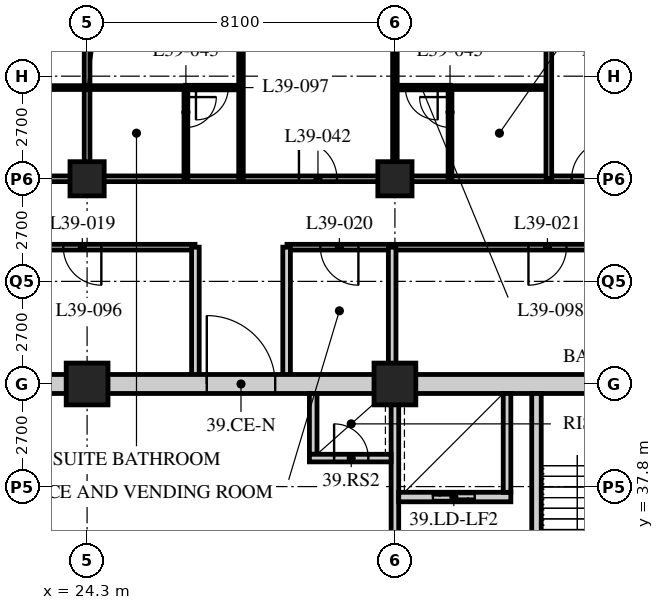
"""IFC4 building model, lengths in metres.
Left out: names, types, materials, properties, quantities, classifications, styles, units other than length and angle.
Written with IfcOpenShell. Run it as: python <this file> out.ifc"""

import sys

from ifc_helpers import new_model, si_unit, direction, frame, frame_2d, origin, origin_2d, place, context, subcontext, project, spatial, rectangle, hollow_rectangle, extrude, element, fill, save


model = new_model("IFC4")
c1 = context("Model", 3, precision=1e-05, world=origin(), true_north=direction((0.0, 1.0)))
c2 = subcontext(c1, "Body", "Model", "MODEL_VIEW")
j1 = project(units=[si_unit("LENGTHUNIT", "METRE"), si_unit("PLANEANGLEUNIT", "RADIAN")], contexts=[c1])
p1 = place(None, origin())
s1 = spatial("IfcSite", under=j1, at=p1, CompositionType="ELEMENT")
p2 = place(p1, origin())
s2 = spatial("IfcBuilding", under=s1, at=p2, CompositionType="ELEMENT")
p3 = place(p2, frame((0.0, 0.0, 151.0)))
s3 = spatial("IfcBuildingStorey", under=s2, at=p3, CompositionType="ELEMENT", Elevation=151.0)
p4 = place(p3, frame((24.3, 40.5, 0.0), z_axis=(0.0, 0.0, 1.0), x_axis=(1.0, 0.0, 0.0)))
e1 = element("IfcColumn", 1, at=p4, inside=s3, PredefinedType="COLUMN", context=c2, shape_type="SweptSolid", body=[
    extrude(hollow_rectangle(XDim=1.1, YDim=1.1, WallThickness=0.1, at=origin_2d()), origin(), (0.0, 0.0, 1.0), 3.4),
])
p5 = place(p3, frame((24.3, 45.9, 0.0), z_axis=(0.0, 0.0, 1.0), x_axis=(1.0, 0.0, 0.0)))
e2 = element("IfcColumn", 2, at=p5, inside=s3, PredefinedType="COLUMN", context=c2, shape_type="SweptSolid", body=[
    extrude(hollow_rectangle(XDim=0.9, YDim=0.9, WallThickness=0.1, at=origin_2d()), origin(), (0.0, 0.0, 1.0), 3.4),
])
p6 = place(p3, frame((32.4, 40.5, 0.0), z_axis=(0.0, 0.0, 1.0), x_axis=(1.0, 0.0, 0.0)))
e3 = element("IfcColumn", 3, at=p6, inside=s3, PredefinedType="COLUMN", context=c2, shape_type="SweptSolid", body=[
    extrude(hollow_rectangle(XDim=1.1, YDim=1.1, WallThickness=0.1, at=origin_2d()), origin(), (0.0, 0.0, 1.0), 3.4),
])
p7 = place(p3, frame((32.4, 45.9, 0.0), z_axis=(0.0, 0.0, 1.0), x_axis=(1.0, 0.0, 0.0)))
e4 = element("IfcColumn", 4, at=p7, inside=s3, PredefinedType="COLUMN", context=c2, shape_type="SweptSolid", body=[
    extrude(hollow_rectangle(XDim=0.9, YDim=0.9, WallThickness=0.1, at=origin_2d()), origin(), (0.0, 0.0, 1.0), 3.4),
])
p8 = place(p3, frame((8.1, 45.9, 0.0), z_axis=(0.0, 0.0, 1.0), x_axis=(1.0, 0.0, 0.0)))
e5 = element("IfcWall", 5, at=p8, inside=s3, PredefinedType="PARTITIONING", context=c2, shape_type="SweptSolid", body=[
    extrude(rectangle(XDim=40.5, YDim=0.15, at=frame_2d((20.25, 0.0))), origin(), (0.0, 0.0, 1.0), 2.42),
])
p9 = place(p8, frame((9.625, 0.0, 0.0)))
e6 = element("IfcOpeningElement", 6, at=p9, cuts=e5, PredefinedType="OPENING", context=c2, shape_type="SweptSolid", body=[
    extrude(rectangle(XDim=1.0, YDim=2.1, at=frame_2d((0.5, 1.05))), frame((0.0, 0.085, 0.0), z_axis=(0.0, -1.0, 0.0), x_axis=(1.0, 0.0, 0.0)), (0.0, 0.0, 1.0), 0.17),
])
p10 = place(p8, frame((21.775, 0.0, 0.0)))
e7 = element("IfcOpeningElement", 7, at=p10, cuts=e5, PredefinedType="OPENING", context=c2, shape_type="SweptSolid", body=[
    extrude(rectangle(XDim=1.0, YDim=2.1, at=frame_2d((0.5, 1.05))), frame((0.0, 0.085, 0.0), z_axis=(0.0, -1.0, 0.0), x_axis=(1.0, 0.0, 0.0)), (0.0, 0.0, 1.0), 0.17),
])
p11 = place(p8, frame((28.95, 0.0, 0.0)))
e8 = element("IfcOpeningElement", 8, at=p11, cuts=e5, PredefinedType="OPENING", context=c2, shape_type="SweptSolid", body=[
    extrude(rectangle(XDim=1.0, YDim=2.1, at=frame_2d((0.5, 1.05))), frame((0.0, 0.085, 0.0), z_axis=(0.0, -1.0, 0.0), x_axis=(1.0, 0.0, 0.0)), (0.0, 0.0, 1.0), 0.17),
])
p12 = place(p8, frame((34.85, 0.0, 0.0)))
e9 = element("IfcOpeningElement", 9, at=p12, cuts=e5, PredefinedType="OPENING", context=c2, shape_type="SweptSolid", body=[
    extrude(rectangle(XDim=1.0, YDim=2.1, at=frame_2d((0.5, 1.05))), frame((0.0, 0.085, 0.0), z_axis=(0.0, -1.0, 0.0), x_axis=(1.0, 0.0, 0.0)), (0.0, 0.0, 1.0), 0.17),
])
p13 = place(p8, frame((36.875, 0.0, 0.0)))
e10 = element("IfcOpeningElement", 10, at=p13, cuts=e5, PredefinedType="OPENING", context=c2, shape_type="SweptSolid", body=[
    extrude(rectangle(XDim=1.0, YDim=2.1, at=frame_2d((0.5, 1.05))), frame((0.0, 0.085, 0.0), z_axis=(0.0, -1.0, 0.0), x_axis=(1.0, 0.0, 0.0)), (0.0, 0.0, 1.0), 0.17),
])
p14 = place(p8, frame((2.625, 0.0, 0.0)))
e11 = element("IfcOpeningElement", 11, at=p14, cuts=e5, PredefinedType="OPENING", context=c2, shape_type="SweptSolid", body=[
    extrude(rectangle(XDim=1.0, YDim=2.1, at=frame_2d((0.5, 1.05))), frame((0.0, 0.085, 0.0), z_axis=(0.0, -1.0, 0.0), x_axis=(1.0, 0.0, 0.0)), (0.0, 0.0, 1.0), 0.17),
])
p15 = place(p3, frame((46.8, 44.1, 0.0), z_axis=(0.0, 0.0, 1.0), x_axis=(-1.0, 0.0, 0.0)))
e12 = element("IfcWall", 12, at=p15, inside=s3, PredefinedType="PARTITIONING", context=c2, shape_type="SweptSolid", body=[
    extrude(rectangle(XDim=17.24, YDim=0.15, at=frame_2d((8.62, 0.0))), origin(), (0.0, 0.0, 1.0), 3.19),
])
p16 = place(p15, frame((15.361, 0.0, 0.0)))
e13 = element("IfcOpeningElement", 13, at=p16, cuts=e12, PredefinedType="OPENING", context=c2, shape_type="SweptSolid", body=[
    extrude(rectangle(XDim=1.0, YDim=2.1, at=frame_2d((0.5, 1.05))), frame((0.0, 0.085, 0.0), z_axis=(0.0, -1.0, 0.0), x_axis=(1.0, 0.0, 0.0)), (0.0, 0.0, 1.0), 0.17),
])
p17 = place(p15, frame((9.886, 0.0, 0.0)))
e14 = element("IfcOpeningElement", 14, at=p17, cuts=e12, PredefinedType="OPENING", context=c2, shape_type="SweptSolid", body=[
    extrude(rectangle(XDim=1.0, YDim=2.1, at=frame_2d((0.5, 1.05))), frame((0.0, 0.085, 0.0), z_axis=(0.0, -1.0, 0.0), x_axis=(1.0, 0.0, 0.0)), (0.0, 0.0, 1.0), 0.17),
])
p18 = place(p15, frame((2.65, 0.0, 0.0)))
e15 = element("IfcOpeningElement", 15, at=p18, cuts=e12, PredefinedType="OPENING", context=c2, shape_type="SweptSolid", body=[
    extrude(rectangle(XDim=1.0, YDim=2.1, at=frame_2d((0.5, 1.05))), frame((0.0, 0.085, 0.0), z_axis=(0.0, -1.0, 0.0), x_axis=(1.0, 0.0, 0.0)), (0.0, 0.0, 1.0), 0.17),
])
p19 = place(p3, frame((27.14, 44.1, 0.0), z_axis=(0.0, 0.0, 1.0), x_axis=(-1.0, 0.0, 0.0)))
e16 = element("IfcWall", 16, at=p19, inside=s3, PredefinedType="PARTITIONING", context=c2, shape_type="SweptSolid", body=[
    extrude(rectangle(XDim=17.24, YDim=0.15, at=frame_2d((8.62, 0.0))), origin(), (0.0, 0.0, 1.0), 3.19),
])
p20 = place(p19, frame((15.351, 0.0, 0.0)))
e17 = element("IfcOpeningElement", 17, at=p20, cuts=e16, PredefinedType="OPENING", context=c2, shape_type="SweptSolid", body=[
    extrude(rectangle(XDim=1.0, YDim=2.1, at=frame_2d((0.5, 1.05))), frame((0.0, 0.085, 0.0), z_axis=(0.0, -1.0, 0.0), x_axis=(1.0, 0.0, 0.0)), (0.0, 0.0, 1.0), 0.17),
])
p21 = place(p19, frame((12.201, 0.0, 0.0)))
e18 = element("IfcOpeningElement", 18, at=p21, cuts=e16, PredefinedType="OPENING", context=c2, shape_type="SweptSolid", body=[
    extrude(rectangle(XDim=1.0, YDim=2.1, at=frame_2d((0.5, 1.05))), frame((0.0, 0.085, 0.0), z_axis=(0.0, -1.0, 0.0), x_axis=(1.0, 0.0, 0.0)), (0.0, 0.0, 1.0), 0.17),
])
p22 = place(p19, frame((7.94, 0.0, 0.0)))
e19 = element("IfcOpeningElement", 19, at=p22, cuts=e16, PredefinedType="OPENING", context=c2, shape_type="SweptSolid", body=[
    extrude(rectangle(XDim=1.0, YDim=2.1, at=frame_2d((0.5, 1.05))), frame((0.0, 0.085, 0.0), z_axis=(0.0, -1.0, 0.0), x_axis=(1.0, 0.0, 0.0)), (0.0, 0.0, 1.0), 0.17),
])
p23 = place(p19, frame((2.465, 0.0, 0.0)))
e20 = element("IfcOpeningElement", 20, at=p23, cuts=e16, PredefinedType="OPENING", context=c2, shape_type="SweptSolid", body=[
    extrude(rectangle(XDim=1.0, YDim=2.1, at=frame_2d((0.5, 1.05))), frame((0.0, 0.085, 0.0), z_axis=(0.0, -1.0, 0.0), x_axis=(1.0, 0.0, 0.0)), (0.0, 0.0, 1.0), 0.17),
])
p24 = place(p3, frame((32.328, 44.1, 0.0), z_axis=(0.0, 0.0, 1.0), x_axis=(0.0, -1.0, 0.0)))
e21 = element("IfcWall", 21, at=p24, inside=s3, PredefinedType="SOLIDWALL", context=c2, shape_type="SweptSolid", body=[
    extrude(rectangle(XDim=3.6, YDim=0.2, at=frame_2d((1.8, 0.0))), origin(), (0.0, 0.0, 1.0), 2.42),
])
for number, where, z_axis, x_axis in (
    (22, (27.15, 40.5, 0.0), (0.0, 0.0, 1.0), (0.0, 1.0, 0.0)),
    (23, (29.55, 40.5, 0.0), (0.0, 0.0, 1.0), (0.0, 1.0, 0.0)),
):
    element("IfcWall", number, at=place(p3, frame(where, z_axis=z_axis, x_axis=x_axis)), inside=s3, PredefinedType="SOLIDWALL", context=c2, shape_type="SweptSolid", body=[
        extrude(rectangle(XDim=3.6, YDim=0.2, at=frame_2d((1.8, 0.0))), origin(), (0.0, 0.0, 1.0), 3.19),
    ])
p25 = place(p3, frame((21.7, 48.3, 0.0), z_axis=(0.0, 0.0, 1.0), x_axis=(1.0, 0.0, 0.0)))
e24 = element("IfcWall", 24, at=p25, inside=s3, PredefinedType="PARTITIONING", context=c2, shape_type="SweptSolid", body=[
    extrude(rectangle(XDim=5.2, YDim=0.1, at=frame_2d((2.6, 0.0))), origin(), (0.0, 0.0, 1.0), 3.19),
])
p26 = place(p3, frame((24.3, 45.9, 0.0), z_axis=(0.0, 0.0, 1.0), x_axis=(0.0, 1.0, 0.0)))
e25 = element("IfcWall", 25, at=p26, inside=s3, PredefinedType="PARTITIONING", context=c2, shape_type="SweptSolid", body=[
    extrude(rectangle(XDim=7.8, YDim=0.15, at=frame_2d((3.9, 0.0))), origin(), (0.0, 0.0, 1.0), 2.42),
])
p27 = place(p3, frame((26.9, 45.9, 0.0), z_axis=(0.0, 0.0, 1.0), x_axis=(0.0, 1.0, 0.0)))
e26 = element("IfcWall", 26, at=p27, inside=s3, PredefinedType="PARTITIONING", context=c2, shape_type="SweptSolid", body=[
    extrude(rectangle(XDim=2.4, YDim=0.1, at=frame_2d((1.2, 0.0))), origin(), (0.0, 0.0, 1.0), 3.19),
])
p28 = place(p27, frame((1.35, 0.0, 0.0)))
e27 = element("IfcOpeningElement", 27, at=p28, cuts=e26, PredefinedType="OPENING", context=c2, shape_type="SweptSolid", body=[
    extrude(rectangle(XDim=0.8, YDim=2.1, at=frame_2d((0.4, 1.05))), frame((0.0, 0.06, 0.0), z_axis=(0.0, -1.0, 0.0), x_axis=(1.0, 0.0, 0.0)), (0.0, 0.0, 1.0), 0.12),
])
p29 = place(p3, frame((28.35, 45.9, 0.0), z_axis=(0.0, 0.0, 1.0), x_axis=(0.0, 1.0, 0.0)))
e28 = element("IfcWall", 28, at=p29, inside=s3, PredefinedType="PARTITIONING", context=c2, shape_type="SweptSolid", body=[
    extrude(rectangle(XDim=7.8, YDim=0.12, at=frame_2d((3.9, 0.0))), origin(), (0.0, 0.0, 1.0), 3.19),
])
p30 = place(p29, frame((4.825, 0.0, 0.0)))
e29 = element("IfcOpeningElement", 29, at=p30, cuts=e28, PredefinedType="OPENING", context=c2, shape_type="SweptSolid", body=[
    extrude(rectangle(XDim=0.85, YDim=2.1, at=frame_2d((0.425, 1.05))), frame((0.0, 0.07, 0.0), z_axis=(0.0, -1.0, 0.0), x_axis=(1.0, 0.0, 0.0)), (0.0, 0.0, 1.0), 0.14),
])
p31 = place(p3, frame((33.85, 48.3, 0.0), z_axis=(0.0, 0.0, 1.0), x_axis=(1.0, 0.0, 0.0)))
e30 = element("IfcWall", 30, at=p31, inside=s3, PredefinedType="PARTITIONING", context=c2, shape_type="SweptSolid", body=[
    extrude(rectangle(XDim=2.6, YDim=0.1, at=frame_2d((1.3, 0.0))), origin(), (0.0, 0.0, 1.0), 3.19),
])
p32 = place(p3, frame((33.85, 45.9, 0.0), z_axis=(0.0, 0.0, 1.0), x_axis=(0.0, 1.0, 0.0)))
e31 = element("IfcWall", 31, at=p32, inside=s3, PredefinedType="PARTITIONING", context=c2, shape_type="SweptSolid", body=[
    extrude(rectangle(XDim=2.4, YDim=0.1, at=frame_2d((1.2, 0.0))), origin(), (0.0, 0.0, 1.0), 3.19),
])
p33 = place(p32, frame((1.35, 0.0, 0.0)))
e32 = element("IfcOpeningElement", 32, at=p33, cuts=e31, PredefinedType="OPENING", context=c2, shape_type="SweptSolid", body=[
    extrude(rectangle(XDim=0.8, YDim=2.1, at=frame_2d((0.4, 1.05))), frame((0.0, 0.06, 0.0), z_axis=(0.0, -1.0, 0.0), x_axis=(1.0, 0.0, 0.0)), (0.0, 0.0, 1.0), 0.12),
])
p34 = place(p3, frame((32.4, 45.9, 0.0), z_axis=(0.0, 0.0, 1.0), x_axis=(0.0, 1.0, 0.0)))
e33 = element("IfcWall", 33, at=p34, inside=s3, PredefinedType="PARTITIONING", context=c2, shape_type="SweptSolid", body=[
    extrude(rectangle(XDim=7.8, YDim=0.12, at=frame_2d((3.9, 0.0))), origin(), (0.0, 0.0, 1.0), 2.42),
])
p35 = place(p34, frame((4.825, 0.0, 0.0)))
e34 = element("IfcOpeningElement", 34, at=p35, cuts=e33, PredefinedType="OPENING", context=c2, shape_type="SweptSolid", body=[
    extrude(rectangle(XDim=0.85, YDim=2.1, at=frame_2d((0.425, 1.05))), frame((0.0, 0.07, 0.0), z_axis=(0.0, -1.0, 0.0), x_axis=(1.0, 0.0, 0.0)), (0.0, 0.0, 1.0), 0.14),
])
p36 = place(p3, frame((36.45, 45.9, 0.0), z_axis=(0.0, 0.0, 1.0), x_axis=(0.0, 1.0, 0.0)))
e35 = element("IfcWall", 35, at=p36, inside=s3, PredefinedType="PARTITIONING", context=c2, shape_type="SweptSolid", body=[
    extrude(rectangle(XDim=7.8, YDim=0.15, at=frame_2d((3.9, 0.0))), origin(), (0.0, 0.0, 1.0), 3.19),
])
p37 = place(p3, frame((26.89, 48.3, 0.0), z_axis=(0.0, 0.0, 1.0), x_axis=(1.0, 0.0, 0.0)))
e36 = element("IfcWall", 36, at=p37, inside=s3, PredefinedType="PARTITIONING", context=c2, shape_type="SweptSolid", body=[
    extrude(rectangle(XDim=1.46, YDim=0.12, at=frame_2d((0.73, 0.0))), origin(), (0.0, 0.0, 1.0), 3.19),
])
p38 = place(p37, frame((0.275, 0.0, 0.0)))
e37 = element("IfcOpeningElement", 37, at=p38, cuts=e36, PredefinedType="OPENING", context=c2, shape_type="SweptSolid", body=[
    extrude(rectangle(XDim=0.85, YDim=2.1, at=frame_2d((0.425, 1.05))), frame((0.0, 0.07, 0.0), z_axis=(0.0, -1.0, 0.0), x_axis=(1.0, 0.0, 0.0)), (0.0, 0.0, 1.0), 0.14),
])
p39 = place(p3, frame((32.4, 48.3, 0.0), z_axis=(0.0, 0.0, 1.0), x_axis=(1.0, 0.0, 0.0)))
e38 = element("IfcWall", 38, at=p39, inside=s3, PredefinedType="PARTITIONING", context=c2, shape_type="SweptSolid", body=[
    extrude(rectangle(XDim=1.46, YDim=0.12, at=frame_2d((0.73, 0.0))), origin(), (0.0, 0.0, 1.0), 3.19),
])
p40 = place(p39, frame((0.275, 0.0, 0.0)))
e39 = element("IfcOpeningElement", 39, at=p40, cuts=e38, PredefinedType="OPENING", context=c2, shape_type="SweptSolid", body=[
    extrude(rectangle(XDim=0.85, YDim=2.1, at=frame_2d((0.425, 1.05))), frame((0.0, 0.07, 0.0), z_axis=(0.0, -1.0, 0.0), x_axis=(1.0, 0.0, 0.0)), (0.0, 0.0, 1.0), 0.14),
])
p41 = place(p3, frame((15.95, 40.5, 0.0), z_axis=(0.0, 0.0, 1.0), x_axis=(1.0, 0.0, 0.0)))
e40 = element("IfcWall", 40, at=p41, inside=s3, PredefinedType="SOLIDWALL", context=c2, shape_type="SweptSolid", body=[
    extrude(rectangle(XDim=24.8, YDim=0.5, at=frame_2d((12.4, 0.0))), origin(), (0.0, 0.0, 1.0), 2.42),
])
p42 = place(p41, frame((11.5, 0.0, 0.0)))
e41 = element("IfcOpeningElement", 41, at=p42, cuts=e40, PredefinedType="OPENING", context=c2, shape_type="SweptSolid", body=[
    extrude(rectangle(XDim=1.8, YDim=2.4, at=frame_2d((0.9, 1.2))), frame((0.0, 0.26, 0.0), z_axis=(0.0, -1.0, 0.0), x_axis=(1.0, 0.0, 0.0)), (0.0, 0.0, 1.0), 0.52),
])
p43 = place(p3, frame((32.4, 32.5, 0.0), z_axis=(0.0, 0.0, 1.0), x_axis=(0.0, 1.0, 0.0)))
e42 = element("IfcWall", 42, at=p43, inside=s3, PredefinedType="SOLIDWALL", context=c2, shape_type="SweptSolid", body=[
    extrude(rectangle(XDim=7.75, YDim=0.2, at=frame_2d((3.875, 0.0))), origin(), (0.0, 0.0, 1.0), 2.578),
])
p44 = place(p43, frame((1.9, 0.0, 0.0)))
e43 = element("IfcOpeningElement", 43, at=p44, cuts=e42, PredefinedType="OPENING", context=c2, shape_type="SweptSolid", body=[
    extrude(rectangle(XDim=1.2, YDim=2.1, at=frame_2d((0.6, 1.05))), frame((0.0, 0.11, 0.0), z_axis=(0.0, -1.0, 0.0), x_axis=(1.0, 0.0, 0.0)), (0.0, 0.0, 1.0), 0.22),
])
p45 = place(p3, frame((36.125, 32.5, 0.0), z_axis=(0.0, 0.0, 1.0), x_axis=(0.0, 1.0, 0.0)))
e44 = element("IfcWall", 44, at=p45, inside=s3, PredefinedType="SOLIDWALL", context=c2, shape_type="SweptSolid", body=[
    extrude(rectangle(XDim=7.75, YDim=0.25, at=frame_2d((3.875, 0.0))), origin(), (0.0, 0.0, 1.0), 3.19),
])
p46 = place(p45, frame((0.45, 0.0, 0.0)))
e45 = element("IfcOpeningElement", 45, at=p46, cuts=e44, PredefinedType="OPENING", context=c2, shape_type="SweptSolid", body=[
    extrude(rectangle(XDim=1.2, YDim=2.1, at=frame_2d((0.6, 1.05))), frame((0.0, 0.135, 0.0), z_axis=(0.0, -1.0, 0.0), x_axis=(1.0, 0.0, 0.0)), (0.0, 0.0, 1.0), 0.27),
])
p47 = place(p3, frame((32.5, 37.525, 0.0), z_axis=(0.0, 0.0, 1.0), x_axis=(1.0, 0.0, 0.0)))
e46 = element("IfcWall", 46, at=p47, inside=s3, PredefinedType="SOLIDWALL", context=c2, shape_type="SweptSolid", body=[
    extrude(rectangle(XDim=2.95, YDim=0.25, at=frame_2d((1.475, 0.0))), origin(), (0.0, 0.0, 1.0), 3.19),
])
p48 = place(p47, frame((0.9, 0.0, 0.0)))
e47 = element("IfcOpeningElement", 47, at=p48, cuts=e46, PredefinedType="OPENING", context=c2, shape_type="SweptSolid", body=[
    extrude(rectangle(XDim=1.1, YDim=2.4, at=frame_2d((0.55, 1.2))), frame((0.0, 0.135, 0.0), z_axis=(0.0, -1.0, 0.0), x_axis=(1.0, 0.0, 0.0)), (0.0, 0.0, 1.0), 0.27),
])
p49 = place(p3, frame((35.35, 37.65, 0.0), z_axis=(0.0, 0.0, 1.0), x_axis=(0.0, 1.0, 0.0)))
e48 = element("IfcWall", 48, at=p49, inside=s3, PredefinedType="SOLIDWALL", context=c2, shape_type="SweptSolid", body=[
    extrude(rectangle(XDim=2.6, YDim=0.2, at=frame_2d((1.3, 0.0))), origin(), (0.0, 0.0, 1.0), 3.19),
])
p50 = place(p3, frame((30.25, 38.65, 0.0), z_axis=(0.0, 0.0, 1.0), x_axis=(0.0, 1.0, 0.0)))
e49 = element("IfcWall", 49, at=p50, inside=s3, PredefinedType="SOLIDWALL", context=c2, shape_type="SweptSolid", body=[
    extrude(rectangle(XDim=1.6, YDim=0.2, at=frame_2d((0.8, 0.0))), origin(), (0.0, 0.0, 1.0), 3.19),
])
p51 = place(p3, frame((30.15, 38.55, 0.0), z_axis=(0.0, 0.0, 1.0), x_axis=(1.0, 0.0, 0.0)))
e50 = element("IfcWall", 50, at=p51, inside=s3, PredefinedType="SOLIDWALL", context=c2, shape_type="SweptSolid", body=[
    extrude(rectangle(XDim=2.15, YDim=0.2, at=frame_2d((1.075, 0.0))), origin(), (0.0, 0.0, 1.0), 3.19),
])
p52 = place(p51, frame((0.65, 0.0, 0.0)))
e51 = element("IfcOpeningElement", 51, at=p52, cuts=e50, PredefinedType="OPENING", context=c2, shape_type="SweptSolid", body=[
    extrude(rectangle(XDim=0.9, YDim=2.1, at=frame_2d((0.45, 1.05))), frame((0.0, 0.11, 0.0), z_axis=(0.0, -1.0, 0.0), x_axis=(1.0, 0.0, 0.0)), (0.0, 0.0, 1.0), 0.22),
])
p53 = place(p23, origin())
e52 = element("IfcDoor", 52, at=p53, inside=s3, OperationType="SINGLE_SWING_LEFT", PredefinedType="DOOR", context=c2, shape_type="SweptSolid", body=[
    extrude(rectangle(XDim=1.0, YDim=2.1, at=frame_2d((0.5, 1.05))), frame((0.0, 0.025, 0.0), z_axis=(0.0, -1.0, 0.0), x_axis=(1.0, 0.0, 0.0)), (0.0, 0.0, 1.0), 0.05),
])
fill(e20, e52)
p54 = place(p16, origin())
e53 = element("IfcDoor", 53, at=p54, inside=s3, OperationType="SINGLE_SWING_LEFT", PredefinedType="DOOR", context=c2, shape_type="SweptSolid", body=[
    extrude(rectangle(XDim=1.0, YDim=2.1, at=frame_2d((0.5, 1.05))), frame((0.0, 0.025, 0.0), z_axis=(0.0, -1.0, 0.0), x_axis=(1.0, 0.0, 0.0)), (0.0, 0.0, 1.0), 0.05),
])
fill(e13, e53)
p55 = place(p17, origin())
e54 = element("IfcDoor", 54, at=p55, inside=s3, OperationType="SINGLE_SWING_RIGHT", PredefinedType="DOOR", context=c2, shape_type="SweptSolid", body=[
    extrude(rectangle(XDim=1.0, YDim=2.1, at=frame_2d((0.5, 1.05))), frame((0.0, 0.025, 0.0), z_axis=(0.0, -1.0, 0.0), x_axis=(1.0, 0.0, 0.0)), (0.0, 0.0, 1.0), 0.05),
])
fill(e14, e54)
p56 = place(p10, origin())
e55 = element("IfcDoor", 55, at=p56, inside=s3, OperationType="SINGLE_SWING_LEFT", PredefinedType="DOOR", context=c2, shape_type="SweptSolid", body=[
    extrude(rectangle(XDim=1.0, YDim=2.1, at=frame_2d((0.5, 1.05))), frame((0.0, 0.025, 0.0), z_axis=(0.0, -1.0, 0.0), x_axis=(1.0, 0.0, 0.0)), (0.0, 0.0, 1.0), 0.05),
])
fill(e7, e55)
p57 = place(p28, origin())
e56 = element("IfcDoor", 56, at=p57, inside=s3, OperationType="SINGLE_SWING_LEFT", PredefinedType="DOOR", context=c2, shape_type="SweptSolid", body=[
    extrude(rectangle(XDim=0.8, YDim=2.1, at=frame_2d((0.4, 1.05))), frame((0.0, 0.025, 0.0), z_axis=(0.0, -1.0, 0.0), x_axis=(1.0, 0.0, 0.0)), (0.0, 0.0, 1.0), 0.05),
])
fill(e27, e56)
p58 = place(p33, origin())
e57 = element("IfcDoor", 57, at=p58, inside=s3, OperationType="SINGLE_SWING_RIGHT", PredefinedType="DOOR", context=c2, shape_type="SweptSolid", body=[
    extrude(rectangle(XDim=0.8, YDim=2.1, at=frame_2d((0.4, 1.05))), frame((0.0, 0.025, 0.0), z_axis=(0.0, -1.0, 0.0), x_axis=(1.0, 0.0, 0.0)), (0.0, 0.0, 1.0), 0.05),
])
fill(e32, e57)
p59 = place(p11, origin())
e58 = element("IfcDoor", 58, at=p59, inside=s3, OperationType="SINGLE_SWING_RIGHT", PredefinedType="DOOR", context=c2, shape_type="SweptSolid", body=[
    extrude(rectangle(XDim=1.0, YDim=2.1, at=frame_2d((0.5, 1.05))), frame((0.0, 0.025, 0.0), z_axis=(0.0, -1.0, 0.0), x_axis=(1.0, 0.0, 0.0)), (0.0, 0.0, 1.0), 0.05),
])
fill(e8, e58)
p60 = place(p38, origin())
e59 = element("IfcDoor", 59, at=p60, inside=s3, OperationType="SINGLE_SWING_RIGHT", PredefinedType="DOOR", context=c2, shape_type="SweptSolid", body=[
    extrude(rectangle(XDim=0.85, YDim=2.1, at=frame_2d((0.425, 1.05))), frame((0.0, 0.025, 0.0), z_axis=(0.0, -1.0, 0.0), x_axis=(1.0, 0.0, 0.0)), (0.0, 0.0, 1.0), 0.05),
])
fill(e37, e59)
p61 = place(p40, origin())
e60 = element("IfcDoor", 60, at=p61, inside=s3, OperationType="SINGLE_SWING_LEFT", PredefinedType="DOOR", context=c2, shape_type="SweptSolid", body=[
    extrude(rectangle(XDim=0.85, YDim=2.1, at=frame_2d((0.425, 1.05))), frame((0.0, 0.025, 0.0), z_axis=(0.0, -1.0, 0.0), x_axis=(1.0, 0.0, 0.0)), (0.0, 0.0, 1.0), 0.05),
])
fill(e39, e60)
p62 = place(p52, origin())
e61 = element("IfcDoor", 61, at=p62, inside=s3, OperationType="SINGLE_SWING_LEFT", PredefinedType="DOOR", context=c2, shape_type="SweptSolid", body=[
    extrude(rectangle(XDim=0.9, YDim=2.1, at=frame_2d((0.45, 1.05))), frame((0.0, 0.025, 0.0), z_axis=(0.0, -1.0, 0.0), x_axis=(1.0, 0.0, 0.0)), (0.0, 0.0, 1.0), 0.05),
])
fill(e51, e61)
p63 = place(p48, origin())
e62 = element("IfcDoor", 62, at=p63, inside=s3, OperationType="DOUBLE_DOOR_SLIDING", PredefinedType="DOOR", context=c2, shape_type="SweptSolid", body=[
    extrude(rectangle(XDim=1.1, YDim=2.4, at=frame_2d((0.55, 1.2))), frame((0.0, 0.025, 0.0), z_axis=(0.0, -1.0, 0.0), x_axis=(1.0, 0.0, 0.0)), (0.0, 0.0, 1.0), 0.05),
])
fill(e47, e62)
p64 = place(p42, origin())
e63 = element("IfcDoor", 63, at=p64, inside=s3, OperationType="DOUBLE_DOOR_SINGLE_SWING", PredefinedType="DOOR", context=c2, shape_type="SweptSolid", body=[
    extrude(rectangle(XDim=1.8, YDim=2.4, at=frame_2d((0.9, 1.2))), frame((0.0, 0.025, 0.0), z_axis=(0.0, -1.0, 0.0), x_axis=(1.0, 0.0, 0.0)), (0.0, 0.0, 1.0), 0.05),
])
fill(e41, e63)
save(model, sys.argv[1])
